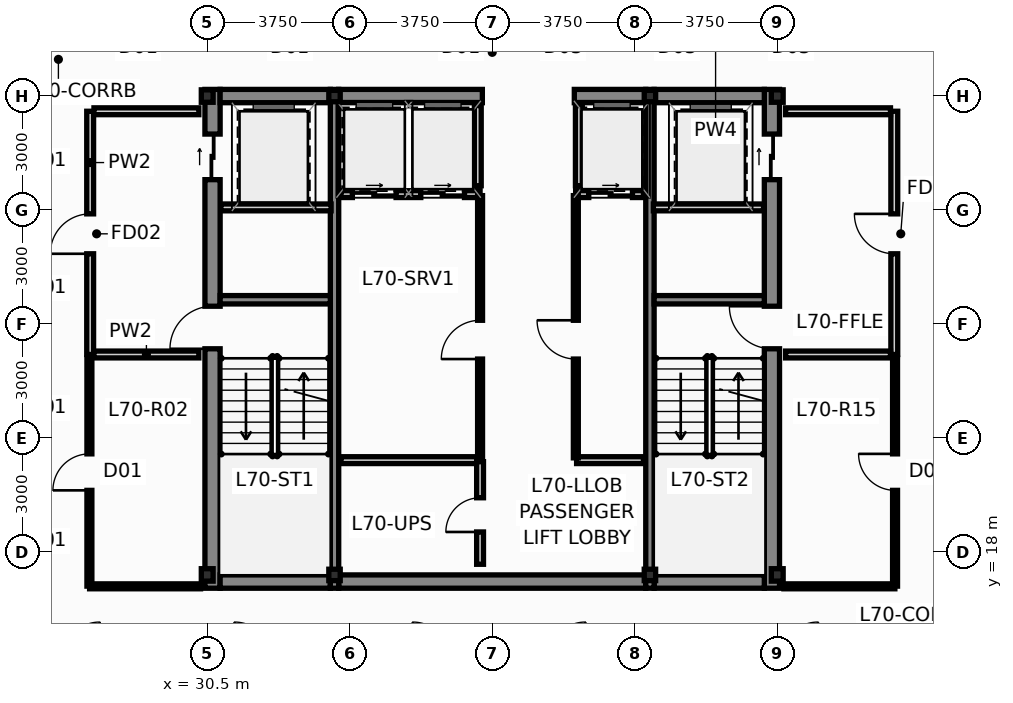
"""IFC4 building model, lengths in metres.
Left out: names, types, materials, properties, quantities, classifications, styles, units other than length and angle.
Written with IfcOpenShell. Run it as: python <this file> out.ifc"""

import sys

from ifc_helpers import new_model, si_unit, direction, frame, frame_2d, origin, origin_2d, place, context, subcontext, project, spatial, rectangle, hollow_rectangle, i_section, extrude, source, transform, mapped, element, fill, save


model = new_model("IFC4")
c1 = context("Model", 3, precision=1e-05, world=origin(), true_north=direction((0.0, 1.0)))
c2 = subcontext(c1, "Body", "Model", "MODEL_VIEW")
j1 = project(units=[si_unit("LENGTHUNIT", "METRE"), si_unit("PLANEANGLEUNIT", "RADIAN")], contexts=[c1])
p1 = place(None, origin())
s1 = spatial("IfcSite", under=j1, at=p1, CompositionType="ELEMENT")
p2 = place(p1, origin())
s2 = spatial("IfcBuilding", under=s1, at=p2, CompositionType="ELEMENT")
p3 = place(p2, frame((0.0, 0.0, 266.35)))
s3 = spatial("IfcBuildingStorey", under=s2, at=p3, CompositionType="ELEMENT", Elevation=266.35)
m1 = source(origin(), c2, "Body", "SweptSolid", [
    extrude(i_section(OverallWidth=0.311, OverallDepth=0.327, WebThickness=0.016, FlangeThickness=0.025, at=origin_2d()), origin(), (0.0, 0.0, 1.0), 3.65),
])
for number, where, z_axis, x_axis in (
    (1, (30.5, 17.4, 0.0), (0.0, 0.0, 1.0), (1.0, 0.0, 0.0)),
    (2, (45.5, 17.4, 0.0), (0.0, 0.0, 1.0), (1.0, 0.0, 0.0)),
    (3, (45.5, 30.0, 0.0), (0.0, 0.0, 1.0), (1.0, 0.0, 0.0)),
    (4, (30.5, 30.0, 0.0), (0.0, 0.0, 1.0), (1.0, 0.0, 0.0)),
):
    element("IfcColumn", number, at=place(p3, frame(where, z_axis=z_axis, x_axis=x_axis)), inside=s3, PredefinedType="COLUMN", context=c2, shape_type="MappedRepresentation", body=[
        mapped(m1, transform((0.0, 0.0, 0.0), scale=1.0)),
    ])
m2 = source(origin(), c2, "Body", "SweptSolid", [
    extrude(hollow_rectangle(XDim=0.3, YDim=0.3, WallThickness=0.012, at=origin_2d()), origin(), (0.0, 0.0, 1.0), 3.65),
])
for number, where, z_axis, x_axis in (
    (5, (33.85, 17.4, 0.0), (0.0, 0.0, 1.0), (1.0, 0.0, 0.0)),
    (6, (42.15, 17.4, 0.0), (0.0, 0.0, 1.0), (1.0, 0.0, 0.0)),
    (7, (33.85, 30.0, 0.0), (0.0, 0.0, 1.0), (1.0, 0.0, 0.0)),
    (8, (42.15, 30.0, 0.0), (0.0, 0.0, 1.0), (1.0, 0.0, 0.0)),
):
    element("IfcColumn", number, at=place(p3, frame(where, z_axis=z_axis, x_axis=x_axis)), inside=s3, PredefinedType="COLUMN", context=c2, shape_type="MappedRepresentation", body=[
        mapped(m2, transform((0.0, 0.0, 0.0), scale=1.0)),
    ])
p4 = place(p3, frame((30.64, 17.05, 0.0), z_axis=(0.0, 0.0, 1.0), x_axis=(0.0, 1.0, 0.0)))
e9 = element("IfcWall", 9, at=p4, inside=s3, PredefinedType="SHEAR", context=c2, shape_type="SweptSolid", body=[
    extrude(rectangle(XDim=13.125, YDim=0.4, at=frame_2d((6.562, 0.0))), origin(), (0.0, 0.0, 1.0), 3.65),
])
p5 = place(p4, frame((6.3, 0.0, 0.0)))
e10 = element("IfcOpeningElement", 10, at=p5, cuts=e9, PredefinedType="OPENING", context=c2, shape_type="SweptSolid", body=[
    extrude(rectangle(XDim=1.12, YDim=2.15, at=frame_2d((0.56, 1.075))), frame((0.0, 0.212, 0.0), z_axis=(0.0, -1.0, 0.0), x_axis=(1.0, 0.0, 0.0)), (0.0, 0.0, 1.0), 0.424),
])
p6 = place(p4, frame((10.75, 0.0, 0.0)))
e11 = element("IfcOpeningElement", 11, at=p6, cuts=e9, PredefinedType="OPENING", context=c2, shape_type="SweptSolid", body=[
    extrude(rectangle(XDim=1.2, YDim=2.2, at=frame_2d((0.6, 1.1))), frame((0.0, 0.212, 0.0), z_axis=(0.0, -1.0, 0.0), x_axis=(1.0, 0.0, 0.0)), (0.0, 0.0, 1.0), 0.424),
])
p7 = place(p3, frame((45.36, 17.05, 0.0), z_axis=(0.0, 0.0, 1.0), x_axis=(0.0, 1.0, 0.0)))
e12 = element("IfcWall", 12, at=p7, inside=s3, PredefinedType="SHEAR", context=c2, shape_type="SweptSolid", body=[
    extrude(rectangle(XDim=13.125, YDim=0.4, at=frame_2d((6.562, 0.0))), origin(), (0.0, 0.0, 1.0), 3.65),
])
p8 = place(p7, frame((6.3, 0.0, 0.0)))
e13 = element("IfcOpeningElement", 13, at=p8, cuts=e12, PredefinedType="OPENING", context=c2, shape_type="SweptSolid", body=[
    extrude(rectangle(XDim=1.12, YDim=2.15, at=frame_2d((0.56, 1.075))), frame((0.0, 0.212, 0.0), z_axis=(0.0, -1.0, 0.0), x_axis=(1.0, 0.0, 0.0)), (0.0, 0.0, 1.0), 0.424),
])
p9 = place(p7, frame((10.75, 0.0, 0.0)))
e14 = element("IfcOpeningElement", 14, at=p9, cuts=e12, PredefinedType="OPENING", context=c2, shape_type="SweptSolid", body=[
    extrude(rectangle(XDim=1.2, YDim=2.2, at=frame_2d((0.6, 1.1))), frame((0.0, 0.212, 0.0), z_axis=(0.0, -1.0, 0.0), x_axis=(1.0, 0.0, 0.0)), (0.0, 0.0, 1.0), 0.424),
])
p10 = place(p3, frame((30.84, 17.225, 0.0), z_axis=(0.0, 0.0, 1.0), x_axis=(1.0, 0.0, 0.0)))
e15 = element("IfcWall", 15, at=p10, inside=s3, PredefinedType="SHEAR", context=c2, shape_type="SweptSolid", body=[
    extrude(rectangle(XDim=2.9, YDim=0.35, at=frame_2d((1.45, 0.0))), origin(), (0.0, 0.0, 1.0), 3.65),
])
p11 = place(p3, frame((33.96, 17.225, 0.0), z_axis=(0.0, 0.0, 1.0), x_axis=(1.0, 0.0, 0.0)))
e16 = element("IfcWall", 16, at=p11, inside=s3, PredefinedType="SHEAR", context=c2, shape_type="SweptSolid", body=[
    extrude(rectangle(XDim=8.08, YDim=0.35, at=frame_2d((4.04, 0.0))), origin(), (0.0, 0.0, 1.0), 3.65),
])
for number, where, z_axis, x_axis in (
    (17, (42.26, 17.225, 0.0), (0.0, 0.0, 1.0), (1.0, 0.0, 0.0)),
    (18, (30.84, 30.0, 0.0), (0.0, 0.0, 1.0), (1.0, 0.0, 0.0)),
):
    element("IfcWall", number, at=place(p3, frame(where, z_axis=z_axis, x_axis=x_axis)), inside=s3, PredefinedType="SHEAR", context=c2, shape_type="SweptSolid", body=[
        extrude(rectangle(XDim=2.9, YDim=0.35, at=frame_2d((1.45, 0.0))), origin(), (0.0, 0.0, 1.0), 3.65),
    ])
p12 = place(p3, frame((33.96, 30.0, 0.0), z_axis=(0.0, 0.0, 1.0), x_axis=(1.0, 0.0, 0.0)))
e19 = element("IfcWall", 19, at=p12, inside=s3, PredefinedType="SHEAR", context=c2, shape_type="SweptSolid", body=[
    extrude(rectangle(XDim=3.78, YDim=0.35, at=frame_2d((1.89, 0.0))), origin(), (0.0, 0.0, 1.0), 3.65),
])
p13 = place(p3, frame((40.16, 30.0, 0.0), z_axis=(0.0, 0.0, 1.0), x_axis=(1.0, 0.0, 0.0)))
e20 = element("IfcWall", 20, at=p13, inside=s3, PredefinedType="SHEAR", context=c2, shape_type="SweptSolid", body=[
    extrude(rectangle(XDim=1.88, YDim=0.35, at=frame_2d((0.94, 0.0))), origin(), (0.0, 0.0, 1.0), 3.65),
])
p14 = place(p3, frame((42.26, 30.0, 0.0), z_axis=(0.0, 0.0, 1.0), x_axis=(1.0, 0.0, 0.0)))
e21 = element("IfcWall", 21, at=p14, inside=s3, PredefinedType="SHEAR", context=c2, shape_type="SweptSolid", body=[
    extrude(rectangle(XDim=2.9, YDim=0.35, at=frame_2d((1.45, 0.0))), origin(), (0.0, 0.0, 1.0), 3.65),
])
for number, where, z_axis, x_axis in (
    (22, (33.85, 17.05, 0.0), (0.0, 0.0, 1.0), (0.0, 1.0, 0.0)),
    (23, (42.15, 17.05, 0.0), (0.0, 0.0, 1.0), (0.0, 1.0, 0.0)),
):
    element("IfcWall", number, at=place(p3, frame(where, z_axis=z_axis, x_axis=x_axis)), inside=s3, PredefinedType="SHEAR", context=c2, shape_type="SweptSolid", body=[
        extrude(rectangle(XDim=13.125, YDim=0.22, at=frame_2d((6.562, 0.0))), origin(), (0.0, 0.0, 1.0), 3.65),
    ])
for number, where, z_axis, x_axis in (
    (24, (30.84, 24.64, 0.0), (0.0, 0.0, 1.0), (1.0, 0.0, 0.0)),
    (25, (42.26, 24.64, 0.0), (0.0, 0.0, 1.0), (1.0, 0.0, 0.0)),
):
    element("IfcWall", number, at=place(p3, frame(where, z_axis=z_axis, x_axis=x_axis)), inside=s3, PredefinedType="SHEAR", context=c2, shape_type="SweptSolid", body=[
        extrude(rectangle(XDim=2.9, YDim=0.22, at=frame_2d((1.45, 0.0))), origin(), (0.0, 0.0, 1.0), 3.65),
    ])
p15 = place(p3, frame((34.02, 27.42, 0.0), z_axis=(0.0, 0.0, 1.0), x_axis=(1.0, 0.0, 0.0)))
e26 = element("IfcWall", 26, at=p15, inside=s3, PredefinedType="PARTITIONING", context=c2, shape_type="SweptSolid", body=[
    extrude(rectangle(XDim=3.66, YDim=0.18, at=frame_2d((1.83, 0.0))), origin(), (0.0, 0.0, 1.0), 3.4),
])
p16 = place(p15, frame((0.3, 0.0, 0.0)))
e27 = element("IfcOpeningElement", 27, at=p16, cuts=e26, PredefinedType="OPENING", context=c2, shape_type="SweptSolid", body=[
    extrude(rectangle(XDim=1.15, YDim=2.2, at=frame_2d((0.575, 1.1))), frame((0.0, 0.102, 0.0), z_axis=(0.0, -1.0, 0.0), x_axis=(1.0, 0.0, 0.0)), (0.0, 0.0, 1.0), 0.204),
])
p17 = place(p15, frame((2.1, 0.0, 0.0)))
e28 = element("IfcOpeningElement", 28, at=p17, cuts=e26, PredefinedType="OPENING", context=c2, shape_type="SweptSolid", body=[
    extrude(rectangle(XDim=1.15, YDim=2.2, at=frame_2d((0.575, 1.1))), frame((0.0, 0.102, 0.0), z_axis=(0.0, -1.0, 0.0), x_axis=(1.0, 0.0, 0.0)), (0.0, 0.0, 1.0), 0.204),
])
p18 = place(p3, frame((40.22, 27.42, 0.0), z_axis=(0.0, 0.0, 1.0), x_axis=(1.0, 0.0, 0.0)))
e29 = element("IfcWall", 29, at=p18, inside=s3, PredefinedType="PARTITIONING", context=c2, shape_type="SweptSolid", body=[
    extrude(rectangle(XDim=1.76, YDim=0.18, at=frame_2d((0.88, 0.0))), origin(), (0.0, 0.0, 1.0), 3.4),
])
p19 = place(p18, frame((0.32, 0.0, 0.0)))
e30 = element("IfcOpeningElement", 30, at=p19, cuts=e29, PredefinedType="OPENING", context=c2, shape_type="SweptSolid", body=[
    extrude(rectangle(XDim=1.15, YDim=2.2, at=frame_2d((0.575, 1.1))), frame((0.0, 0.102, 0.0), z_axis=(0.0, -1.0, 0.0), x_axis=(1.0, 0.0, 0.0)), (0.0, 0.0, 1.0), 0.204),
])
for number, where, z_axis, x_axis in (
    (31, (37.62, 27.64, 0.0), (0.0, 0.0, 1.0), (0.0, 1.0, 0.0)),
    (32, (40.28, 27.64, 0.0), (0.0, 0.0, 1.0), (0.0, 1.0, 0.0)),
):
    element("IfcWall", number, at=place(p3, frame(where, z_axis=z_axis, x_axis=x_axis)), inside=s3, PredefinedType="PARTITIONING", context=c2, shape_type="SweptSolid", body=[
        extrude(rectangle(XDim=2.11, YDim=0.18, at=frame_2d((1.055, 0.0))), origin(), (0.0, 0.0, 1.0), 3.4),
    ])
p20 = place(p3, frame((27.42, 23.2, 0.0), z_axis=(0.0, 0.0, 1.0), x_axis=(0.0, 1.0, 0.0)))
e33 = element("IfcWall", 33, at=p20, inside=s3, PredefinedType="PARTITIONING", context=c2, shape_type="SweptSolid", body=[
    extrude(rectangle(XDim=6.4, YDim=0.18, at=frame_2d((3.2, 0.0))), origin(), (0.0, 0.0, 1.0), 3.129),
])
p21 = place(p20, frame((2.65, 0.0, 0.0)))
e34 = element("IfcOpeningElement", 34, at=p21, cuts=e33, PredefinedType="OPENING", context=c2, shape_type="SweptSolid", body=[
    extrude(rectangle(XDim=1.05, YDim=2.15, at=frame_2d((0.525, 1.075))), frame((0.0, 0.102, 0.0), z_axis=(0.0, -1.0, 0.0), x_axis=(1.0, 0.0, 0.0)), (0.0, 0.0, 1.0), 0.204),
])
for number, where, z_axis, x_axis in (
    (35, (27.52, 23.2, 0.0), (0.0, 0.0, 1.0), (1.0, 0.0, 0.0)),
    (36, (27.52, 29.6, 0.0), (0.0, 0.0, 1.0), (1.0, 0.0, 0.0)),
):
    element("IfcWall", number, at=place(p3, frame(where, z_axis=z_axis, x_axis=x_axis)), inside=s3, PredefinedType="PARTITIONING", context=c2, shape_type="SweptSolid", body=[
        extrude(rectangle(XDim=2.76, YDim=0.18, at=frame_2d((1.38, 0.0))), origin(), (0.0, 0.0, 1.0), 3.4),
    ])
p22 = place(p3, frame((48.58, 23.2, 0.0), z_axis=(0.0, 0.0, 1.0), x_axis=(0.0, 1.0, 0.0)))
e37 = element("IfcWall", 37, at=p22, inside=s3, PredefinedType="PARTITIONING", context=c2, shape_type="SweptSolid", body=[
    extrude(rectangle(XDim=6.4, YDim=0.18, at=frame_2d((3.2, 0.0))), origin(), (0.0, 0.0, 1.0), 3.129),
])
p23 = place(p22, frame((2.65, 0.0, 0.0)))
e38 = element("IfcOpeningElement", 38, at=p23, cuts=e37, PredefinedType="OPENING", context=c2, shape_type="SweptSolid", body=[
    extrude(rectangle(XDim=1.05, YDim=2.15, at=frame_2d((0.525, 1.075))), frame((0.0, 0.102, 0.0), z_axis=(0.0, -1.0, 0.0), x_axis=(1.0, 0.0, 0.0)), (0.0, 0.0, 1.0), 0.204),
])
for number, where, z_axis, x_axis in (
    (39, (45.72, 23.2, 0.0), (0.0, 0.0, 1.0), (1.0, 0.0, 0.0)),
    (40, (45.72, 29.6, 0.0), (0.0, 0.0, 1.0), (1.0, 0.0, 0.0)),
):
    element("IfcWall", number, at=place(p3, frame(where, z_axis=z_axis, x_axis=x_axis)), inside=s3, PredefinedType="PARTITIONING", context=c2, shape_type="SweptSolid", body=[
        extrude(rectangle(XDim=2.76, YDim=0.18, at=frame_2d((1.38, 0.0))), origin(), (0.0, 0.0, 1.0), 3.4),
    ])
for number, where, z_axis, x_axis in (
    (41, (30.86, 27.07, 0.0), (0.0, 0.0, 1.0), (1.0, 0.0, 0.0)),
    (42, (42.24, 27.07, 0.0), (0.0, 0.0, 1.0), (1.0, 0.0, 0.0)),
):
    element("IfcWall", number, at=place(p3, frame(where, z_axis=z_axis, x_axis=x_axis)), inside=s3, PredefinedType="PARTITIONING", context=c2, shape_type="SweptSolid", body=[
        extrude(rectangle(XDim=2.9, YDim=0.18, at=frame_2d((1.45, 0.0))), origin(), (0.0, 0.0, 1.0), 3.4),
    ])
p24 = place(p3, frame((34.02, 20.42, 0.0), z_axis=(0.0, 0.0, 1.0), x_axis=(1.0, 0.0, 0.0)))
e43 = element("IfcWall", 43, at=p24, inside=s3, PredefinedType="PARTITIONING", context=c2, shape_type="SweptSolid", body=[
    extrude(rectangle(XDim=3.64, YDim=0.18, at=frame_2d((1.82, 0.0))), origin(), (0.0, 0.0, 1.0), 3.4),
])
p25 = place(p3, frame((40.22, 20.42, 0.0), z_axis=(0.0, 0.0, 1.0), x_axis=(1.0, 0.0, 0.0)))
e44 = element("IfcWall", 44, at=p25, inside=s3, PredefinedType="PARTITIONING", context=c2, shape_type="SweptSolid", body=[
    extrude(rectangle(XDim=1.76, YDim=0.18, at=frame_2d((0.88, 0.0))), origin(), (0.0, 0.0, 1.0), 3.4),
])
p26 = place(p3, frame((37.68, 20.48, 0.0), z_axis=(0.0, 0.0, 1.0), x_axis=(0.0, 1.0, 0.0)))
e45 = element("IfcWall", 45, at=p26, inside=s3, PredefinedType="PARTITIONING", context=c2, shape_type="SweptSolid", body=[
    extrude(rectangle(XDim=6.9, YDim=0.13, at=frame_2d((3.45, 0.0))), origin(), (0.0, 0.0, 1.0), 3.4),
])
p27 = place(p26, frame((2.6, 0.0, 0.0)))
e46 = element("IfcOpeningElement", 46, at=p27, cuts=e45, PredefinedType="OPENING", context=c2, shape_type="SweptSolid", body=[
    extrude(rectangle(XDim=1.02, YDim=2.15, at=frame_2d((0.51, 1.075))), frame((0.0, 0.077, 0.0), z_axis=(0.0, -1.0, 0.0), x_axis=(1.0, 0.0, 0.0)), (0.0, 0.0, 1.0), 0.154),
])
p28 = place(p3, frame((40.2, 20.48, 0.0), z_axis=(0.0, 0.0, 1.0), x_axis=(0.0, 1.0, 0.0)))
e47 = element("IfcWall", 47, at=p28, inside=s3, PredefinedType="PARTITIONING", context=c2, shape_type="SweptSolid", body=[
    extrude(rectangle(XDim=6.9, YDim=0.13, at=frame_2d((3.45, 0.0))), origin(), (0.0, 0.0, 1.0), 3.4),
])
p29 = place(p28, frame((2.6, 0.0, 0.0)))
e48 = element("IfcOpeningElement", 48, at=p29, cuts=e47, PredefinedType="OPENING", context=c2, shape_type="SweptSolid", body=[
    extrude(rectangle(XDim=1.02, YDim=2.15, at=frame_2d((0.51, 1.075))), frame((0.0, 0.077, 0.0), z_axis=(0.0, -1.0, 0.0), x_axis=(1.0, 0.0, 0.0)), (0.0, 0.0, 1.0), 0.154),
])
p30 = place(p3, frame((37.68, 17.68, 0.0), z_axis=(0.0, 0.0, 1.0), x_axis=(0.0, 1.0, 0.0)))
e49 = element("IfcWall", 49, at=p30, inside=s3, PredefinedType="PARTITIONING", context=c2, shape_type="SweptSolid", body=[
    extrude(rectangle(XDim=2.7, YDim=0.18, at=frame_2d((1.35, 0.0))), origin(), (0.0, 0.0, 1.0), 3.4),
])
p31 = place(p30, frame((0.85, 0.0, 0.0)))
e50 = element("IfcOpeningElement", 50, at=p31, cuts=e49, PredefinedType="OPENING", context=c2, shape_type="SweptSolid", body=[
    extrude(rectangle(XDim=0.9, YDim=2.1, at=frame_2d((0.45, 1.05))), frame((0.0, 0.102, 0.0), z_axis=(0.0, -1.0, 0.0), x_axis=(1.0, 0.0, 0.0)), (0.0, 0.0, 1.0), 0.204),
])
p32 = place(p3, frame((27.4, 17.105, 0.0), z_axis=(0.0, 0.0, 1.0), x_axis=(0.0, 1.0, 0.0)))
e51 = element("IfcWall", 51, at=p32, inside=s3, PredefinedType="PARTITIONING", context=c2, shape_type="SweptSolid", body=[
    extrude(rectangle(XDim=6.0, YDim=0.13, at=frame_2d((3.0, 0.0))), origin(), (0.0, 0.0, 1.0), 3.129),
])
p33 = place(p32, frame((2.52, 0.0, 0.0)))
e52 = element("IfcOpeningElement", 52, at=p33, cuts=e51, PredefinedType="OPENING", context=c2, shape_type="SweptSolid", body=[
    extrude(rectangle(XDim=0.96, YDim=2.15, at=frame_2d((0.48, 1.075))), frame((0.0, 0.077, 0.0), z_axis=(0.0, -1.0, 0.0), x_axis=(1.0, 0.0, 0.0)), (0.0, 0.0, 1.0), 0.154),
])
p34 = place(p3, frame((48.6, 17.105, 0.0), z_axis=(0.0, 0.0, 1.0), x_axis=(0.0, 1.0, 0.0)))
e53 = element("IfcWall", 53, at=p34, inside=s3, PredefinedType="PARTITIONING", context=c2, shape_type="SweptSolid", body=[
    extrude(rectangle(XDim=6.0, YDim=0.13, at=frame_2d((3.0, 0.0))), origin(), (0.0, 0.0, 1.0), 3.129),
])
p35 = place(p34, frame((2.52, 0.0, 0.0)))
e54 = element("IfcOpeningElement", 54, at=p35, cuts=e53, PredefinedType="OPENING", context=c2, shape_type="SweptSolid", body=[
    extrude(rectangle(XDim=0.96, YDim=2.15, at=frame_2d((0.48, 1.075))), frame((0.0, 0.077, 0.0), z_axis=(0.0, -1.0, 0.0), x_axis=(1.0, 0.0, 0.0)), (0.0, 0.0, 1.0), 0.154),
])
for number, where, z_axis, x_axis in (
    (55, (30.325, 17.1, 0.0), (0.0, 0.0, 1.0), (-1.0, 0.0, 0.0)),
    (56, (45.675, 17.1, 0.0), (0.0, 0.0, 1.0), (1.0, 0.0, 0.0)),
):
    element("IfcWall", number, at=place(p3, frame(where, z_axis=z_axis, x_axis=x_axis)), inside=s3, PredefinedType="PARTITIONING", context=c2, shape_type="SweptSolid", body=[
        extrude(rectangle(XDim=2.92, YDim=0.13, at=frame_2d((1.46, 0.0))), origin(), (0.0, 0.0, 1.0), 2.985),
    ])
p36 = place(p5, origin())
e57 = element("IfcDoor", 57, at=p36, inside=s3, OperationType="SINGLE_SWING_LEFT", PredefinedType="DOOR", context=c2, shape_type="SweptSolid", body=[
    extrude(rectangle(XDim=1.12, YDim=2.15, at=frame_2d((0.56, 1.075))), frame((0.0, 0.025, 0.0), z_axis=(0.0, -1.0, 0.0), x_axis=(1.0, 0.0, 0.0)), (0.0, 0.0, 1.0), 0.05),
])
fill(e10, e57)
p37 = place(p6, origin())
e58 = element("IfcDoor", 58, at=p37, inside=s3, OperationType="SLIDING_TO_LEFT", PredefinedType="DOOR", context=c2, shape_type="SweptSolid", body=[
    extrude(rectangle(XDim=1.2, YDim=2.2, at=frame_2d((0.6, 1.1))), frame((0.0, 0.025, 0.0), z_axis=(0.0, -1.0, 0.0), x_axis=(1.0, 0.0, 0.0)), (0.0, 0.0, 1.0), 0.05),
])
fill(e11, e58)
p38 = place(p8, origin())
e59 = element("IfcDoor", 59, at=p38, inside=s3, OperationType="SINGLE_SWING_RIGHT", PredefinedType="DOOR", context=c2, shape_type="SweptSolid", body=[
    extrude(rectangle(XDim=1.12, YDim=2.15, at=frame_2d((0.56, 1.075))), frame((0.0, 0.025, 0.0), z_axis=(0.0, -1.0, 0.0), x_axis=(1.0, 0.0, 0.0)), (0.0, 0.0, 1.0), 0.05),
])
fill(e13, e59)
p39 = place(p9, origin())
e60 = element("IfcDoor", 60, at=p39, inside=s3, OperationType="SLIDING_TO_RIGHT", PredefinedType="DOOR", context=c2, shape_type="SweptSolid", body=[
    extrude(rectangle(XDim=1.2, YDim=2.2, at=frame_2d((0.6, 1.1))), frame((0.0, 0.025, 0.0), z_axis=(0.0, -1.0, 0.0), x_axis=(1.0, 0.0, 0.0)), (0.0, 0.0, 1.0), 0.05),
])
fill(e14, e60)
p40 = place(p16, origin())
e61 = element("IfcDoor", 61, at=p40, inside=s3, OperationType="SLIDING_TO_RIGHT", PredefinedType="DOOR", context=c2, shape_type="SweptSolid", body=[
    extrude(rectangle(XDim=1.15, YDim=2.2, at=frame_2d((0.575, 1.1))), frame((0.0, 0.025, 0.0), z_axis=(0.0, -1.0, 0.0), x_axis=(1.0, 0.0, 0.0)), (0.0, 0.0, 1.0), 0.05),
])
fill(e27, e61)
p41 = place(p17, origin())
e62 = element("IfcDoor", 62, at=p41, inside=s3, OperationType="SLIDING_TO_LEFT", PredefinedType="DOOR", context=c2, shape_type="SweptSolid", body=[
    extrude(rectangle(XDim=1.15, YDim=2.2, at=frame_2d((0.575, 1.1))), frame((0.0, 0.025, 0.0), z_axis=(0.0, -1.0, 0.0), x_axis=(1.0, 0.0, 0.0)), (0.0, 0.0, 1.0), 0.05),
])
fill(e28, e62)
p42 = place(p19, origin())
e63 = element("IfcDoor", 63, at=p42, inside=s3, OperationType="SLIDING_TO_RIGHT", PredefinedType="DOOR", context=c2, shape_type="SweptSolid", body=[
    extrude(rectangle(XDim=1.15, YDim=2.2, at=frame_2d((0.575, 1.1))), frame((0.0, 0.025, 0.0), z_axis=(0.0, -1.0, 0.0), x_axis=(1.0, 0.0, 0.0)), (0.0, 0.0, 1.0), 0.05),
])
fill(e30, e63)
p43 = place(p21, origin())
e64 = element("IfcDoor", 64, at=p43, inside=s3, OperationType="SINGLE_SWING_LEFT", PredefinedType="DOOR", context=c2, shape_type="SweptSolid", body=[
    extrude(rectangle(XDim=1.05, YDim=2.15, at=frame_2d((0.525, 1.075))), frame((0.0, 0.025, 0.0), z_axis=(0.0, -1.0, 0.0), x_axis=(1.0, 0.0, 0.0)), (0.0, 0.0, 1.0), 0.05),
])
fill(e34, e64)
p44 = place(p23, origin())
e65 = element("IfcDoor", 65, at=p44, inside=s3, OperationType="SINGLE_SWING_RIGHT", PredefinedType="DOOR", context=c2, shape_type="SweptSolid", body=[
    extrude(rectangle(XDim=1.05, YDim=2.15, at=frame_2d((0.525, 1.075))), frame((0.0, 0.025, 0.0), z_axis=(0.0, -1.0, 0.0), x_axis=(1.0, 0.0, 0.0)), (0.0, 0.0, 1.0), 0.05),
])
fill(e38, e65)
p45 = place(p27, origin())
e66 = element("IfcDoor", 66, at=p45, inside=s3, OperationType="SINGLE_SWING_LEFT", PredefinedType="DOOR", context=c2, shape_type="SweptSolid", body=[
    extrude(rectangle(XDim=1.02, YDim=2.15, at=frame_2d((0.51, 1.075))), frame((0.0, 0.025, 0.0), z_axis=(0.0, -1.0, 0.0), x_axis=(1.0, 0.0, 0.0)), (0.0, 0.0, 1.0), 0.05),
])
fill(e46, e66)
p46 = place(p29, origin())
e67 = element("IfcDoor", 67, at=p46, inside=s3, OperationType="SINGLE_SWING_RIGHT", PredefinedType="DOOR", context=c2, shape_type="SweptSolid", body=[
    extrude(rectangle(XDim=1.02, YDim=2.15, at=frame_2d((0.51, 1.075))), frame((0.0, 0.025, 0.0), z_axis=(0.0, -1.0, 0.0), x_axis=(1.0, 0.0, 0.0)), (0.0, 0.0, 1.0), 0.05),
])
fill(e48, e67)
p47 = place(p31, origin())
e68 = element("IfcDoor", 68, at=p47, inside=s3, OperationType="SINGLE_SWING_LEFT", PredefinedType="DOOR", context=c2, shape_type="SweptSolid", body=[
    extrude(rectangle(XDim=0.9, YDim=2.1, at=frame_2d((0.45, 1.05))), frame((0.0, 0.025, 0.0), z_axis=(0.0, -1.0, 0.0), x_axis=(1.0, 0.0, 0.0)), (0.0, 0.0, 1.0), 0.05),
])
fill(e50, e68)
p48 = place(p33, origin())
e69 = element("IfcDoor", 69, at=p48, inside=s3, OperationType="SINGLE_SWING_LEFT", PredefinedType="DOOR", context=c2, shape_type="SweptSolid", body=[
    extrude(rectangle(XDim=0.96, YDim=2.15, at=frame_2d((0.48, 1.075))), frame((0.0, 0.025, 0.0), z_axis=(0.0, -1.0, 0.0), x_axis=(1.0, 0.0, 0.0)), (0.0, 0.0, 1.0), 0.05),
])
fill(e52, e69)
p49 = place(p35, origin())
e70 = element("IfcDoor", 70, at=p49, inside=s3, OperationType="SINGLE_SWING_RIGHT", PredefinedType="DOOR", context=c2, shape_type="SweptSolid", body=[
    extrude(rectangle(XDim=0.96, YDim=2.15, at=frame_2d((0.48, 1.075))), frame((0.0, 0.025, 0.0), z_axis=(0.0, -1.0, 0.0), x_axis=(1.0, 0.0, 0.0)), (0.0, 0.0, 1.0), 0.05),
])
fill(e54, e70)
save(model, sys.argv[1])
